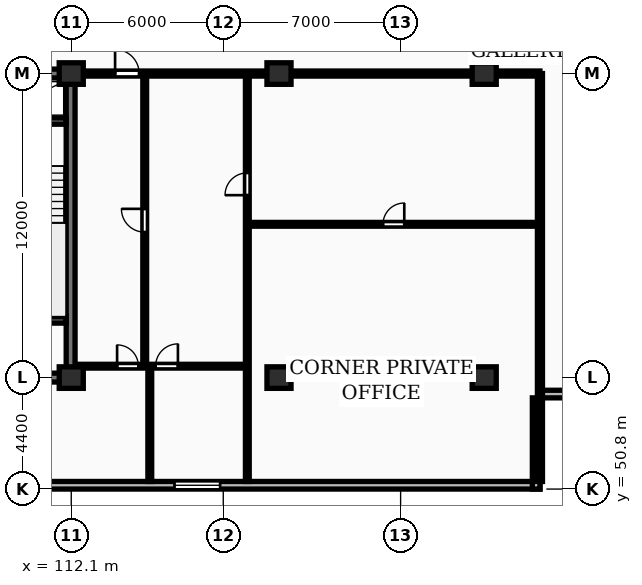
"""IFC4 building model, lengths in metres.
Left out: names, types, materials, properties, quantities, classifications, styles, units other than length and angle.
Written with IfcOpenShell. Run it as: python <this file> out.ifc"""

import sys

from ifc_helpers import new_model, si_unit, direction, frame, frame_2d, origin, origin_2d, place, context, subcontext, project, spatial, rectangle, extrude, element, fill, save


model = new_model("IFC4")
c1 = context("Model", 3, precision=1e-05, world=origin(), true_north=direction((0.0, 1.0)))
c2 = subcontext(c1, "Body", "Model", "MODEL_VIEW")
j1 = project(units=[si_unit("LENGTHUNIT", "METRE"), si_unit("PLANEANGLEUNIT", "RADIAN")], contexts=[c1])
p1 = place(None, origin())
s1 = spatial("IfcSite", under=j1, at=p1, CompositionType="ELEMENT")
p2 = place(p1, origin())
s2 = spatial("IfcBuilding", under=s1, at=p2, CompositionType="ELEMENT")
p3 = place(p2, frame((0.0, 0.0, 100.3)))
s3 = spatial("IfcBuildingStorey", under=s2, at=p3, CompositionType="ELEMENT", Elevation=100.3)
for number, where, z_axis, x_axis in (
    (1, (112.1, 55.2, 0.0), (0.0, 0.0, 1.0), (1.0, 0.0, 0.0)),
    (2, (112.1, 67.2, 0.0), (0.0, 0.0, 1.0), (1.0, 0.0, 0.0)),
    (3, (120.3, 55.2, 0.0), (0.0, 0.0, 1.0), (1.0, 0.0, 0.0)),
    (4, (120.3, 67.2, 0.0), (0.0, 0.0, 1.0), (1.0, 0.0, 0.0)),
    (5, (128.4, 55.2, 0.0), (0.0, 0.0, 1.0), (1.0, 0.0, 0.0)),
    (6, (128.4, 67.2, 0.0), (0.0, 0.0, 1.0), (1.0, 0.0, 0.0)),
):
    element("IfcColumn", number, at=place(p3, frame(where, z_axis=z_axis, x_axis=x_axis)), inside=s3, PredefinedType="COLUMN", context=c2, shape_type="SweptSolid", body=[
        extrude(rectangle(XDim=0.95, YDim=0.85, at=origin_2d()), origin(), (0.0, 0.0, 1.0), 3.25),
    ])
p4 = place(p3, frame((57.6, 50.95, 0.0), z_axis=(0.0, 0.0, 1.0), x_axis=(1.0, 0.0, 0.0)))
e7 = element("IfcWall", 7, at=p4, inside=s3, PredefinedType="STANDARD", context=c2, shape_type="SweptSolid", body=[
    extrude(rectangle(XDim=73.0, YDim=0.3, at=frame_2d((36.5, 0.0))), origin(), (0.0, 0.0, 1.0), 2.97),
])
p5 = place(p4, frame((15.225, 0.0, 0.85)))
e8 = element("IfcOpeningElement", 8, at=p5, cuts=e7, PredefinedType="OPENING", context=c2, shape_type="SweptSolid", body=[
    extrude(rectangle(XDim=1.8, YDim=1.8, at=frame_2d((0.9, 0.9))), frame((0.0, 0.16, 0.0), z_axis=(0.0, -1.0, 0.0), x_axis=(1.0, 0.0, 0.0)), (0.0, 0.0, 1.0), 0.32),
])
p6 = place(p4, frame((58.575, 0.0, 0.85)))
e9 = element("IfcOpeningElement", 9, at=p6, cuts=e7, PredefinedType="OPENING", context=c2, shape_type="SweptSolid", body=[
    extrude(rectangle(XDim=1.8, YDim=1.8, at=frame_2d((0.9, 0.9))), frame((0.0, 0.16, 0.0), z_axis=(0.0, -1.0, 0.0), x_axis=(1.0, 0.0, 0.0)), (0.0, 0.0, 1.0), 0.32),
])
for number, where, z_axis, x_axis in (
    (10, (130.45, 50.8, 0.0), (0.0, 0.0, 1.0), (0.0, 1.0, 0.0)),
    (11, (130.6, 54.55, 0.0), (0.0, 0.0, 1.0), (1.0, 0.0, 0.0)),
):
    element("IfcWall", number, at=place(p3, frame(where, z_axis=z_axis, x_axis=x_axis)), inside=s3, PredefinedType="STANDARD", context=c2, shape_type="SweptSolid", body=[
        extrude(rectangle(XDim=3.6, YDim=0.3, at=frame_2d((1.8, 0.0))), origin(), (0.0, 0.0, 1.0), 2.97),
    ])
p7 = place(p3, frame((75.95, 55.2, 0.0), z_axis=(0.0, 0.0, 1.0), x_axis=(1.0, 0.0, 0.0)))
e12 = element("IfcWall", 12, at=p7, inside=s3, PredefinedType="SHEAR", context=c2, shape_type="SweptSolid", body=[
    extrude(rectangle(XDim=36.3, YDim=0.35, at=frame_2d((18.15, 0.0))), origin(), (0.0, 0.0, 1.0), 3.25),
])
p8 = place(p3, frame((112.075, 55.375, 0.0), z_axis=(0.0, 0.0, 1.0), x_axis=(0.0, 1.0, 0.0)))
e13 = element("IfcWall", 13, at=p8, inside=s3, PredefinedType="SHEAR", context=c2, shape_type="SweptSolid", body=[
    extrude(rectangle(XDim=11.65, YDim=0.35, at=frame_2d((5.825, 0.0))), origin(), (0.0, 0.0, 1.0), 3.25),
])
p9 = place(p3, frame((75.95, 67.2, 0.0), z_axis=(0.0, 0.0, 1.0), x_axis=(1.0, 0.0, 0.0)))
e14 = element("IfcWall", 14, at=p9, inside=s3, PredefinedType="SHEAR", context=c2, shape_type="SweptSolid", body=[
    extrude(rectangle(XDim=36.3, YDim=0.35, at=frame_2d((18.15, 0.0))), origin(), (0.0, 0.0, 1.0), 3.25),
])
p10 = place(p9, frame((5.25, 0.0, 0.0)))
e15 = element("IfcOpeningElement", 15, at=p10, cuts=e14, PredefinedType="OPENING", context=c2, shape_type="SweptSolid", body=[
    extrude(rectangle(XDim=1.0, YDim=2.15, at=frame_2d((0.5, 1.075))), frame((0.0, 0.185, 0.0), z_axis=(0.0, -1.0, 0.0), x_axis=(1.0, 0.0, 0.0)), (0.0, 0.0, 1.0), 0.37),
])
p11 = place(p9, frame((21.6, 0.0, 0.0)))
e16 = element("IfcOpeningElement", 16, at=p11, cuts=e14, PredefinedType="OPENING", context=c2, shape_type="SweptSolid", body=[
    extrude(rectangle(XDim=1.5, YDim=2.2, at=frame_2d((0.75, 1.1))), frame((0.0, 0.185, 0.0), z_axis=(0.0, -1.0, 0.0), x_axis=(1.0, 0.0, 0.0)), (0.0, 0.0, 1.0), 0.37),
])
p12 = place(p9, frame((30.45, 0.0, 0.0)))
e17 = element("IfcOpeningElement", 17, at=p12, cuts=e14, PredefinedType="OPENING", context=c2, shape_type="SweptSolid", body=[
    extrude(rectangle(XDim=1.0, YDim=2.15, at=frame_2d((0.5, 1.075))), frame((0.0, 0.185, 0.0), z_axis=(0.0, -1.0, 0.0), x_axis=(1.0, 0.0, 0.0)), (0.0, 0.0, 1.0), 0.37),
])
for number, where, z_axis, x_axis in (
    (18, (108.66, 57.475, 0.0), (0.0, 0.0, 1.0), (1.0, 0.0, 0.0)),
    (19, (108.66, 65.325, 0.0), (0.0, 0.0, 1.0), (1.0, 0.0, 0.0)),
):
    element("IfcWall", number, at=place(p3, frame(where, z_axis=z_axis, x_axis=x_axis)), inside=s3, PredefinedType="SHEAR", context=c2, shape_type="SweptSolid", body=[
        extrude(rectangle(XDim=3.24, YDim=0.25, at=frame_2d((1.62, 0.0))), origin(), (0.0, 0.0, 1.0), 3.25),
    ])
p13 = place(p3, frame((130.6, 51.1, 0.0), z_axis=(0.0, 0.0, 1.0), x_axis=(0.0, 1.0, 0.0)))
e20 = element("IfcWall", 20, at=p13, inside=s3, PredefinedType="PARTITIONING", context=c2, shape_type="SweptSolid", body=[
    extrude(rectangle(XDim=16.1, YDim=0.2, at=frame_2d((8.05, 0.0))), origin(), (0.0, 0.0, 1.0), 2.97),
])
p14 = place(p3, frame((119.05, 61.25, 0.0), z_axis=(0.0, 0.0, 1.0), x_axis=(1.0, 0.0, 0.0)))
e21 = element("IfcWall", 21, at=p14, inside=s3, PredefinedType="PARTITIONING", context=c2, shape_type="SweptSolid", body=[
    extrude(rectangle(XDim=11.55, YDim=0.15, at=frame_2d((5.775, 0.0))), origin(), (0.0, 0.0, 1.0), 2.97),
])
p15 = place(p14, frame((5.355, 0.0, 0.0)))
e22 = element("IfcOpeningElement", 22, at=p15, cuts=e21, PredefinedType="OPENING", context=c2, shape_type="SweptSolid", body=[
    extrude(rectangle(XDim=0.84, YDim=2.04, at=frame_2d((0.42, 1.02))), frame((0.0, 0.085, 0.0), z_axis=(0.0, -1.0, 0.0), x_axis=(1.0, 0.0, 0.0)), (0.0, 0.0, 1.0), 0.17),
])
p16 = place(p3, frame((119.05, 51.1, 0.0), z_axis=(0.0, 0.0, 1.0), x_axis=(0.0, 1.0, 0.0)))
e23 = element("IfcWall", 23, at=p16, inside=s3, PredefinedType="PARTITIONING", context=c2, shape_type="SweptSolid", body=[
    extrude(rectangle(XDim=16.05, YDim=0.15, at=frame_2d((8.025, 0.0))), origin(), (0.0, 0.0, 1.0), 2.97),
])
p17 = place(p16, frame((11.3, 0.0, 0.0)))
e24 = element("IfcOpeningElement", 24, at=p17, cuts=e23, PredefinedType="OPENING", context=c2, shape_type="SweptSolid", body=[
    extrude(rectangle(XDim=0.88, YDim=2.06, at=frame_2d((0.44, 1.03))), frame((0.0, 0.085, 0.0), z_axis=(0.0, -1.0, 0.0), x_axis=(1.0, 0.0, 0.0)), (0.0, 0.0, 1.0), 0.17),
])
p18 = place(p3, frame((115.0, 55.65, 0.0), z_axis=(0.0, 0.0, 1.0), x_axis=(0.0, 1.0, 0.0)))
e25 = element("IfcWall", 25, at=p18, inside=s3, PredefinedType="PARTITIONING", context=c2, shape_type="SweptSolid", body=[
    extrude(rectangle(XDim=11.5, YDim=0.15, at=frame_2d((5.75, 0.0))), origin(), (0.0, 0.0, 1.0), 2.97),
])
p19 = place(p18, frame((5.29, 0.0, 0.0)))
e26 = element("IfcOpeningElement", 26, at=p19, cuts=e25, PredefinedType="OPENING", context=c2, shape_type="SweptSolid", body=[
    extrude(rectangle(XDim=0.92, YDim=2.08, at=frame_2d((0.46, 1.04))), frame((0.0, 0.085, 0.0), z_axis=(0.0, -1.0, 0.0), x_axis=(1.0, 0.0, 0.0)), (0.0, 0.0, 1.0), 0.17),
])
p20 = place(p3, frame((115.2, 51.1, 0.0), z_axis=(0.0, 0.0, 1.0), x_axis=(0.0, 1.0, 0.0)))
e27 = element("IfcWall", 27, at=p20, inside=s3, PredefinedType="PARTITIONING", context=c2, shape_type="SweptSolid", body=[
    extrude(rectangle(XDim=4.55, YDim=0.15, at=frame_2d((2.275, 0.0))), origin(), (0.0, 0.0, 1.0), 2.97),
])
p21 = place(p3, frame((112.27, 55.65, 0.0), z_axis=(0.0, 0.0, 1.0), x_axis=(1.0, 0.0, 0.0)))
e28 = element("IfcWall", 28, at=p21, inside=s3, PredefinedType="PARTITIONING", context=c2, shape_type="SweptSolid", body=[
    extrude(rectangle(XDim=6.76, YDim=0.15, at=frame_2d((3.38, 0.0))), origin(), (0.0, 0.0, 1.0), 2.97),
])
p22 = place(p21, frame((1.64, 0.0, 0.0)))
e29 = element("IfcOpeningElement", 29, at=p22, cuts=e28, PredefinedType="OPENING", context=c2, shape_type="SweptSolid", body=[
    extrude(rectangle(XDim=0.84, YDim=2.04, at=frame_2d((0.42, 1.02))), frame((0.0, 0.085, 0.0), z_axis=(0.0, -1.0, 0.0), x_axis=(1.0, 0.0, 0.0)), (0.0, 0.0, 1.0), 0.17),
])
p23 = place(p21, frame((3.16, 0.0, 0.0)))
e30 = element("IfcOpeningElement", 30, at=p23, cuts=e28, PredefinedType="OPENING", context=c2, shape_type="SweptSolid", body=[
    extrude(rectangle(XDim=0.88, YDim=2.06, at=frame_2d((0.44, 1.03))), frame((0.0, 0.085, 0.0), z_axis=(0.0, -1.0, 0.0), x_axis=(1.0, 0.0, 0.0)), (0.0, 0.0, 1.0), 0.17),
])
p24 = place(p3, frame((112.25, 67.2, 0.0), z_axis=(0.0, 0.0, 1.0), x_axis=(1.0, 0.0, 0.0)))
e31 = element("IfcWall", 31, at=p24, inside=s3, PredefinedType="PARTITIONING", context=c2, shape_type="SweptSolid", body=[
    extrude(rectangle(XDim=18.35, YDim=0.2, at=frame_2d((9.175, 0.0))), origin(), (0.0, 0.0, 1.0), 2.433),
])
p25 = place(p24, frame((1.58, 0.0, 0.0)))
e32 = element("IfcOpeningElement", 32, at=p25, cuts=e31, PredefinedType="OPENING", context=c2, shape_type="SweptSolid", body=[
    extrude(rectangle(XDim=0.95, YDim=2.15, at=frame_2d((0.475, 1.075))), frame((0.0, 0.11, 0.0), z_axis=(0.0, -1.0, 0.0), x_axis=(1.0, 0.0, 0.0)), (0.0, 0.0, 1.0), 0.22),
])
p26 = place(p6, origin())
e33 = element("IfcWindow", 33, at=p26, inside=s3, PartitioningType="SINGLE_PANEL", PredefinedType="WINDOW", context=c2, shape_type="SweptSolid", body=[
    extrude(rectangle(XDim=1.8, YDim=1.8, at=frame_2d((0.9, 0.9))), frame((0.0, 0.03, 0.0), z_axis=(0.0, -1.0, 0.0), x_axis=(1.0, 0.0, 0.0)), (0.0, 0.0, 1.0), 0.06),
])
fill(e9, e33)
p27 = place(p15, origin())
e34 = element("IfcDoor", 34, at=p27, inside=s3, OperationType="SINGLE_SWING_RIGHT", PredefinedType="DOOR", context=c2, shape_type="SweptSolid", body=[
    extrude(rectangle(XDim=0.84, YDim=2.04, at=frame_2d((0.42, 1.02))), frame((0.0, 0.025, 0.0), z_axis=(0.0, -1.0, 0.0), x_axis=(1.0, 0.0, 0.0)), (0.0, 0.0, 1.0), 0.05),
])
fill(e22, e34)
p28 = place(p17, origin())
e35 = element("IfcDoor", 35, at=p28, inside=s3, OperationType="SINGLE_SWING_LEFT", PredefinedType="DOOR", context=c2, shape_type="SweptSolid", body=[
    extrude(rectangle(XDim=0.88, YDim=2.06, at=frame_2d((0.44, 1.03))), frame((0.0, 0.025, 0.0), z_axis=(0.0, -1.0, 0.0), x_axis=(1.0, 0.0, 0.0)), (0.0, 0.0, 1.0), 0.05),
])
fill(e24, e35)
p29 = place(p19, origin())
e36 = element("IfcDoor", 36, at=p29, inside=s3, OperationType="SINGLE_SWING_RIGHT", PredefinedType="DOOR", context=c2, shape_type="SweptSolid", body=[
    extrude(rectangle(XDim=0.92, YDim=2.08, at=frame_2d((0.46, 1.04))), frame((0.0, 0.025, 0.0), z_axis=(0.0, -1.0, 0.0), x_axis=(1.0, 0.0, 0.0)), (0.0, 0.0, 1.0), 0.05),
])
fill(e26, e36)
p30 = place(p22, origin())
e37 = element("IfcDoor", 37, at=p30, inside=s3, OperationType="SINGLE_SWING_LEFT", PredefinedType="DOOR", context=c2, shape_type="SweptSolid", body=[
    extrude(rectangle(XDim=0.84, YDim=2.04, at=frame_2d((0.42, 1.02))), frame((0.0, 0.025, 0.0), z_axis=(0.0, -1.0, 0.0), x_axis=(1.0, 0.0, 0.0)), (0.0, 0.0, 1.0), 0.05),
])
fill(e29, e37)
p31 = place(p23, origin())
e38 = element("IfcDoor", 38, at=p31, inside=s3, OperationType="SINGLE_SWING_RIGHT", PredefinedType="DOOR", context=c2, shape_type="SweptSolid", body=[
    extrude(rectangle(XDim=0.88, YDim=2.06, at=frame_2d((0.44, 1.03))), frame((0.0, 0.025, 0.0), z_axis=(0.0, -1.0, 0.0), x_axis=(1.0, 0.0, 0.0)), (0.0, 0.0, 1.0), 0.05),
])
fill(e30, e38)
p32 = place(p25, origin())
e39 = element("IfcDoor", 39, at=p32, inside=s3, OperationType="SINGLE_SWING_LEFT", PredefinedType="DOOR", context=c2, shape_type="SweptSolid", body=[
    extrude(rectangle(XDim=0.95, YDim=2.15, at=frame_2d((0.475, 1.075))), frame((0.0, 0.025, 0.0), z_axis=(0.0, -1.0, 0.0), x_axis=(1.0, 0.0, 0.0)), (0.0, 0.0, 1.0), 0.05),
])
fill(e32, e39)
save(model, sys.argv[1])
